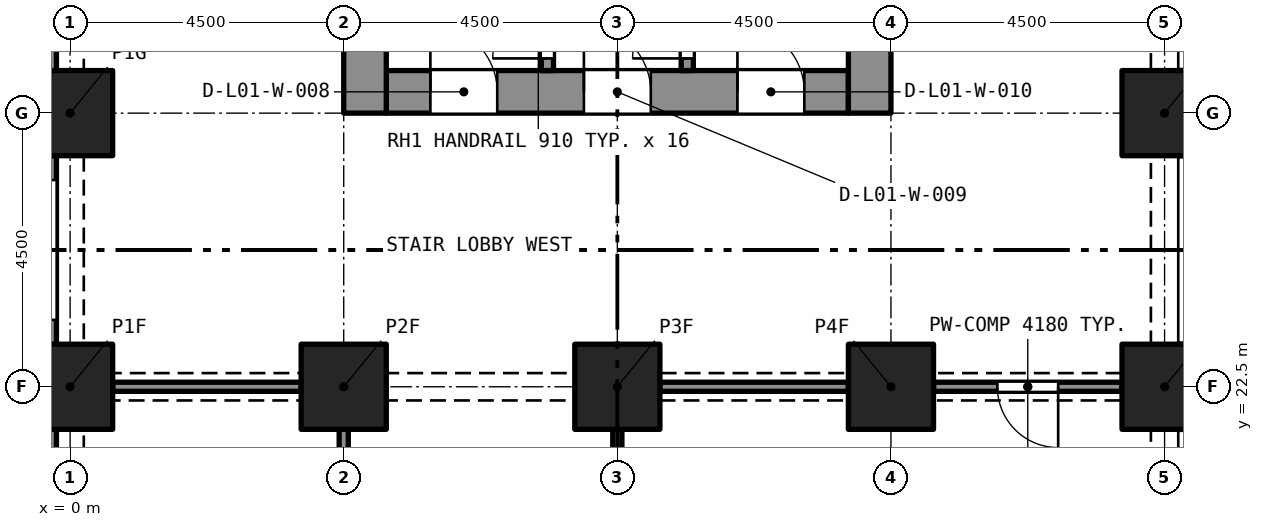
"""IFC4 building model, lengths in metres.
Left out: names, types, materials, properties, quantities, classifications, styles, units other than length and angle.
Written with IfcOpenShell. Run it as: python <this file> out.ifc"""

import sys

from ifc_helpers import new_model, si_unit, direction, frame, frame_2d, origin, origin_2d, place, context, subcontext, project, spatial, rectangle, extrude, element, fill, save


model = new_model("IFC4")
c1 = context("Model", 3, precision=1e-05, world=origin(), true_north=direction((0.0, 1.0)))
c2 = subcontext(c1, "Body", "Model", "MODEL_VIEW")
j1 = project(units=[si_unit("LENGTHUNIT", "METRE"), si_unit("PLANEANGLEUNIT", "RADIAN")], contexts=[c1])
p1 = place(None, origin())
s1 = spatial("IfcSite", under=j1, at=p1, CompositionType="ELEMENT")
p2 = place(p1, origin())
s2 = spatial("IfcBuilding", under=s1, at=p2, CompositionType="ELEMENT")
p3 = place(p2, frame((0.0, 0.0, 6.0)))
s3 = spatial("IfcBuildingStorey", under=s2, at=p3, CompositionType="ELEMENT", Elevation=6.0)
for number, where, z_axis, x_axis in (
    (1, (0.0, 22.5, 0.0), (0.0, 0.0, 1.0), (1.0, 0.0, 0.0)),
    (2, (4.5, 22.5, 0.0), (0.0, 0.0, 1.0), (1.0, 0.0, 0.0)),
    (3, (9.0, 22.5, 0.0), (0.0, 0.0, 1.0), (1.0, 0.0, 0.0)),
    (4, (13.5, 22.5, 0.0), (0.0, 0.0, 1.0), (1.0, 0.0, 0.0)),
    (5, (18.0, 22.5, 0.0), (0.0, 0.0, 1.0), (1.0, 0.0, 0.0)),
    (6, (0.0, 27.0, 0.0), (0.0, 0.0, 1.0), (1.0, 0.0, 0.0)),
    (7, (18.0, 27.0, 0.0), (0.0, 0.0, 1.0), (1.0, 0.0, 0.0)),
):
    element("IfcColumn", number, at=place(p3, frame(where, z_axis=z_axis, x_axis=x_axis)), inside=s3, PredefinedType="COLUMN", context=c2, shape_type="SweptSolid", body=[
        extrude(rectangle(XDim=1.4, YDim=1.4, at=origin_2d()), origin(), (0.0, 0.0, 1.0), 5.0),
    ])
p4 = place(p3, frame((5.2, 27.35, 0.0), z_axis=(0.0, 0.0, 1.0), x_axis=(1.0, 0.0, 0.0)))
e8 = element("IfcWall", 8, at=p4, inside=s3, PredefinedType="SOLIDWALL", context=c2, shape_type="SweptSolid", body=[
    extrude(rectangle(XDim=7.6, YDim=0.7, at=frame_2d((3.8, 0.0))), origin(), (0.0, 0.0, 1.0), 5.0),
])
p5 = place(p4, frame((0.725, 0.0, 0.0)))
e9 = element("IfcOpeningElement", 9, at=p5, cuts=e8, PredefinedType="OPENING", context=c2, shape_type="SweptSolid", body=[
    extrude(rectangle(XDim=1.1, YDim=2.1, at=frame_2d((0.55, 1.05))), frame((0.0, 0.36, 0.0), z_axis=(0.0, -1.0, 0.0), x_axis=(1.0, 0.0, 0.0)), (0.0, 0.0, 1.0), 0.72),
])
p6 = place(p4, frame((3.25, 0.0, 0.0)))
e10 = element("IfcOpeningElement", 10, at=p6, cuts=e8, PredefinedType="OPENING", context=c2, shape_type="SweptSolid", body=[
    extrude(rectangle(XDim=1.1, YDim=2.1, at=frame_2d((0.55, 1.05))), frame((0.0, 0.36, 0.0), z_axis=(0.0, -1.0, 0.0), x_axis=(1.0, 0.0, 0.0)), (0.0, 0.0, 1.0), 0.72),
])
p7 = place(p4, frame((5.775, 0.0, 0.0)))
e11 = element("IfcOpeningElement", 11, at=p7, cuts=e8, PredefinedType="OPENING", context=c2, shape_type="SweptSolid", body=[
    extrude(rectangle(XDim=1.1, YDim=2.1, at=frame_2d((0.55, 1.05))), frame((0.0, 0.36, 0.0), z_axis=(0.0, -1.0, 0.0), x_axis=(1.0, 0.0, 0.0)), (0.0, 0.0, 1.0), 0.72),
])
p8 = place(p3, frame((4.85, 27.0, 0.0), z_axis=(0.0, 0.0, 1.0), x_axis=(0.0, 1.0, 0.0)))
e12 = element("IfcWall", 12, at=p8, inside=s3, PredefinedType="SOLIDWALL", context=c2, shape_type="SweptSolid", body=[
    extrude(rectangle(XDim=13.5, YDim=0.7, at=frame_2d((6.75, 0.0))), origin(), (0.0, 0.0, 1.0), 5.0),
])
p9 = place(p8, frame((8.95, 0.0, 0.0)))
e13 = element("IfcOpeningElement", 13, at=p9, cuts=e12, PredefinedType="OPENING", context=c2, shape_type="SweptSolid", body=[
    extrude(rectangle(XDim=1.2, YDim=2.1, at=frame_2d((0.6, 1.05))), frame((0.0, 0.36, 0.0), z_axis=(0.0, -1.0, 0.0), x_axis=(1.0, 0.0, 0.0)), (0.0, 0.0, 1.0), 0.72),
])
p10 = place(p3, frame((13.15, 27.0, 0.0), z_axis=(0.0, 0.0, 1.0), x_axis=(0.0, 1.0, 0.0)))
e14 = element("IfcWall", 14, at=p10, inside=s3, PredefinedType="SOLIDWALL", context=c2, shape_type="SweptSolid", body=[
    extrude(rectangle(XDim=13.5, YDim=0.7, at=frame_2d((6.75, 0.0))), origin(), (0.0, 0.0, 1.0), 5.0),
])
p11 = place(p10, frame((11.1, 0.0, 0.0)))
e15 = element("IfcOpeningElement", 15, at=p11, cuts=e14, PredefinedType="OPENING", context=c2, shape_type="SweptSolid", body=[
    extrude(rectangle(XDim=1.1, YDim=2.1, at=frame_2d((0.55, 1.05))), frame((0.0, 0.36, 0.0), z_axis=(0.0, -1.0, 0.0), x_axis=(1.0, 0.0, 0.0)), (0.0, 0.0, 1.0), 0.72),
])
p12 = place(p10, frame((8.95, 0.0, 0.0)))
e16 = element("IfcOpeningElement", 16, at=p12, cuts=e14, PredefinedType="OPENING", context=c2, shape_type="SweptSolid", body=[
    extrude(rectangle(XDim=1.2, YDim=2.1, at=frame_2d((0.6, 1.05))), frame((0.0, 0.36, 0.0), z_axis=(0.0, -1.0, 0.0), x_axis=(1.0, 0.0, 0.0)), (0.0, 0.0, 1.0), 0.72),
])
p13 = place(p3, frame((-0.375, 27.7, 0.0), z_axis=(0.0, 0.0, 1.0), x_axis=(0.0, 1.0, 0.0)))
e17 = element("IfcWall", 17, at=p13, inside=s3, PredefinedType="SOLIDWALL", context=c2, shape_type="SweptSolid", body=[
    extrude(rectangle(XDim=3.1, YDim=0.3, at=frame_2d((1.55, 0.0))), origin(), (0.0, 0.0, 1.0), 5.0),
])
p14 = place(p13, frame((0.4, 0.0, 0.45)))
e18 = element("IfcOpeningElement", 18, at=p14, cuts=e17, PredefinedType="OPENING", context=c2, shape_type="SweptSolid", body=[
    extrude(rectangle(XDim=2.3, YDim=3.3, at=frame_2d((1.15, 1.65))), frame((0.0, 0.16, 0.0), z_axis=(0.0, -1.0, 0.0), x_axis=(1.0, 0.0, 0.0)), (0.0, 0.0, 1.0), 0.32),
])
p15 = place(p3, frame((-0.375, 23.2, 0.0), z_axis=(0.0, 0.0, 1.0), x_axis=(0.0, 1.0, 0.0)))
e19 = element("IfcWall", 19, at=p15, inside=s3, PredefinedType="SOLIDWALL", context=c2, shape_type="SweptSolid", body=[
    extrude(rectangle(XDim=3.1, YDim=0.3, at=frame_2d((1.55, 0.0))), origin(), (0.0, 0.0, 1.0), 5.0),
])
p16 = place(p15, frame((0.4, 0.0, 0.45)))
e20 = element("IfcOpeningElement", 20, at=p16, cuts=e19, PredefinedType="OPENING", context=c2, shape_type="SweptSolid", body=[
    extrude(rectangle(XDim=2.3, YDim=3.3, at=frame_2d((1.15, 1.65))), frame((0.0, 0.16, 0.0), z_axis=(0.0, -1.0, 0.0), x_axis=(1.0, 0.0, 0.0)), (0.0, 0.0, 1.0), 0.32),
])
p17 = place(p3, frame((-0.375, 18.7, 0.0), z_axis=(0.0, 0.0, 1.0), x_axis=(0.0, 1.0, 0.0)))
e21 = element("IfcWall", 21, at=p17, inside=s3, PredefinedType="SOLIDWALL", context=c2, shape_type="SweptSolid", body=[
    extrude(rectangle(XDim=3.1, YDim=0.3, at=frame_2d((1.55, 0.0))), origin(), (0.0, 0.0, 1.0), 5.0),
])
p18 = place(p17, frame((0.4, 0.0, 0.45)))
e22 = element("IfcOpeningElement", 22, at=p18, cuts=e21, PredefinedType="OPENING", context=c2, shape_type="SweptSolid", body=[
    extrude(rectangle(XDim=2.3, YDim=3.3, at=frame_2d((1.15, 1.65))), frame((0.0, 0.16, 0.0), z_axis=(0.0, -1.0, 0.0), x_axis=(1.0, 0.0, 0.0)), (0.0, 0.0, 1.0), 0.32),
])
p19 = place(p3, frame((7.85, 27.7, 0.0), z_axis=(0.0, 0.0, 1.0), x_axis=(0.0, 1.0, 0.0)))
e23 = element("IfcWall", 23, at=p19, inside=s3, PredefinedType="SOLIDWALL", context=c2, shape_type="SweptSolid", body=[
    extrude(rectangle(XDim=5.4, YDim=0.2, at=frame_2d((2.7, 0.0))), origin(), (0.0, 0.0, 1.0), 4.65),
])
p20 = place(p19, frame((0.2, 0.0, 0.0)))
e24 = element("IfcOpeningElement", 24, at=p20, cuts=e23, PredefinedType="OPENING", context=c2, shape_type="SweptSolid", body=[
    extrude(rectangle(XDim=0.9, YDim=2.1, at=frame_2d((0.45, 1.05))), frame((0.0, 0.11, 0.0), z_axis=(0.0, -1.0, 0.0), x_axis=(1.0, 0.0, 0.0)), (0.0, 0.0, 1.0), 0.22),
])
p21 = place(p3, frame((10.15, 27.7, 0.0), z_axis=(0.0, 0.0, 1.0), x_axis=(0.0, 1.0, 0.0)))
e25 = element("IfcWall", 25, at=p21, inside=s3, PredefinedType="SOLIDWALL", context=c2, shape_type="SweptSolid", body=[
    extrude(rectangle(XDim=5.4, YDim=0.2, at=frame_2d((2.7, 0.0))), origin(), (0.0, 0.0, 1.0), 4.65),
])
p22 = place(p21, frame((0.2, 0.0, 0.0)))
e26 = element("IfcOpeningElement", 26, at=p22, cuts=e25, PredefinedType="OPENING", context=c2, shape_type="SweptSolid", body=[
    extrude(rectangle(XDim=0.9, YDim=2.1, at=frame_2d((0.45, 1.05))), frame((0.0, 0.11, 0.0), z_axis=(0.0, -1.0, 0.0), x_axis=(1.0, 0.0, 0.0)), (0.0, 0.0, 1.0), 0.22),
])
p23 = place(p3, frame((17.3, 22.5, 0.0), z_axis=(0.0, 0.0, 1.0), x_axis=(-1.0, 0.0, 0.0)))
e27 = element("IfcWall", 27, at=p23, inside=s3, PredefinedType="PARTITIONING", context=c2, shape_type="SweptSolid", body=[
    extrude(rectangle(XDim=3.1, YDim=0.15, at=frame_2d((1.55, 0.0))), origin(), (0.0, 0.0, 1.0), 4.18),
])
p24 = place(p23, frame((1.05, 0.0, 0.0)))
e28 = element("IfcOpeningElement", 28, at=p24, cuts=e27, PredefinedType="OPENING", context=c2, shape_type="SweptSolid", body=[
    extrude(rectangle(XDim=1.0, YDim=2.1, at=frame_2d((0.5, 1.05))), frame((0.0, 0.085, 0.0), z_axis=(0.0, -1.0, 0.0), x_axis=(1.0, 0.0, 0.0)), (0.0, 0.0, 1.0), 0.17),
])
for number, where, z_axis, x_axis in (
    (29, (9.7, 22.5, 0.0), (0.0, 0.0, 1.0), (1.0, 0.0, 0.0)),
    (30, (0.7, 22.5, 0.0), (0.0, 0.0, 1.0), (1.0, 0.0, 0.0)),
):
    element("IfcWall", number, at=place(p3, frame(where, z_axis=z_axis, x_axis=x_axis)), inside=s3, PredefinedType="PARTITIONING", context=c2, shape_type="SweptSolid", body=[
        extrude(rectangle(XDim=3.1, YDim=0.15, at=frame_2d((1.55, 0.0))), origin(), (0.0, 0.0, 1.0), 4.18),
    ])
p25 = place(p3, frame((9.0, 21.8, 0.0), z_axis=(0.0, 0.0, 1.0), x_axis=(0.0, -1.0, 0.0)))
e31 = element("IfcWall", 31, at=p25, inside=s3, PredefinedType="PARTITIONING", context=c2, shape_type="SweptSolid", body=[
    extrude(rectangle(XDim=8.3, YDim=0.15, at=frame_2d((4.15, 0.0))), origin(), (0.0, 0.0, 1.0), 4.65),
])
p26 = place(p25, frame((3.55, 0.0, 0.0)))
e32 = element("IfcOpeningElement", 32, at=p26, cuts=e31, PredefinedType="OPENING", context=c2, shape_type="SweptSolid", body=[
    extrude(rectangle(XDim=1.2, YDim=2.1, at=frame_2d((0.6, 1.05))), frame((0.0, 0.085, 0.0), z_axis=(0.0, -1.0, 0.0), x_axis=(1.0, 0.0, 0.0)), (0.0, 0.0, 1.0), 0.17),
])
p27 = place(p3, frame((4.5, 13.5, 0.0), z_axis=(0.0, 0.0, 1.0), x_axis=(0.0, 1.0, 0.0)))
e33 = element("IfcWall", 33, at=p27, inside=s3, PredefinedType="PARTITIONING", context=c2, shape_type="SweptSolid", body=[
    extrude(rectangle(XDim=8.3, YDim=0.15, at=frame_2d((4.15, 0.0))), origin(), (0.0, 0.0, 1.0), 4.65),
])
p28 = place(p27, frame((3.75, 0.0, 0.0)))
e34 = element("IfcOpeningElement", 34, at=p28, cuts=e33, PredefinedType="OPENING", context=c2, shape_type="SweptSolid", body=[
    extrude(rectangle(XDim=0.8, YDim=2.1, at=frame_2d((0.4, 1.05))), frame((0.0, 0.085, 0.0), z_axis=(0.0, -1.0, 0.0), x_axis=(1.0, 0.0, 0.0)), (0.0, 0.0, 1.0), 0.17),
])
p29 = place(p20, origin())
e35 = element("IfcDoor", 35, at=p29, inside=s3, OperationType="SINGLE_SWING_LEFT", PredefinedType="DOOR", context=c2, shape_type="SweptSolid", body=[
    extrude(rectangle(XDim=0.9, YDim=2.1, at=frame_2d((0.45, 1.05))), frame((0.0, 0.025, 0.0), z_axis=(0.0, -1.0, 0.0), x_axis=(1.0, 0.0, 0.0)), (0.0, 0.0, 1.0), 0.05),
])
fill(e24, e35)
p30 = place(p22, origin())
e36 = element("IfcDoor", 36, at=p30, inside=s3, OperationType="SINGLE_SWING_LEFT", PredefinedType="DOOR", context=c2, shape_type="SweptSolid", body=[
    extrude(rectangle(XDim=0.9, YDim=2.1, at=frame_2d((0.45, 1.05))), frame((0.0, 0.025, 0.0), z_axis=(0.0, -1.0, 0.0), x_axis=(1.0, 0.0, 0.0)), (0.0, 0.0, 1.0), 0.05),
])
fill(e26, e36)
p31 = place(p5, origin())
e37 = element("IfcDoor", 37, at=p31, inside=s3, OperationType="SINGLE_SWING_LEFT", PredefinedType="DOOR", context=c2, shape_type="SweptSolid", body=[
    extrude(rectangle(XDim=1.1, YDim=2.1, at=frame_2d((0.55, 1.05))), frame((0.0, 0.025, 0.0), z_axis=(0.0, -1.0, 0.0), x_axis=(1.0, 0.0, 0.0)), (0.0, 0.0, 1.0), 0.05),
])
fill(e9, e37)
p32 = place(p6, origin())
e38 = element("IfcDoor", 38, at=p32, inside=s3, OperationType="SINGLE_SWING_LEFT", PredefinedType="DOOR", context=c2, shape_type="SweptSolid", body=[
    extrude(rectangle(XDim=1.1, YDim=2.1, at=frame_2d((0.55, 1.05))), frame((0.0, 0.025, 0.0), z_axis=(0.0, -1.0, 0.0), x_axis=(1.0, 0.0, 0.0)), (0.0, 0.0, 1.0), 0.05),
])
fill(e10, e38)
p33 = place(p7, origin())
e39 = element("IfcDoor", 39, at=p33, inside=s3, OperationType="SINGLE_SWING_LEFT", PredefinedType="DOOR", context=c2, shape_type="SweptSolid", body=[
    extrude(rectangle(XDim=1.1, YDim=2.1, at=frame_2d((0.55, 1.05))), frame((0.0, 0.025, 0.0), z_axis=(0.0, -1.0, 0.0), x_axis=(1.0, 0.0, 0.0)), (0.0, 0.0, 1.0), 0.05),
])
fill(e11, e39)
p34 = place(p24, origin())
e40 = element("IfcDoor", 40, at=p34, inside=s3, OperationType="SINGLE_SWING_RIGHT", PredefinedType="DOOR", context=c2, shape_type="SweptSolid", body=[
    extrude(rectangle(XDim=1.0, YDim=2.1, at=frame_2d((0.5, 1.05))), frame((0.0, 0.025, 0.0), z_axis=(0.0, -1.0, 0.0), x_axis=(1.0, 0.0, 0.0)), (0.0, 0.0, 1.0), 0.05),
])
fill(e28, e40)
save(model, sys.argv[1])
